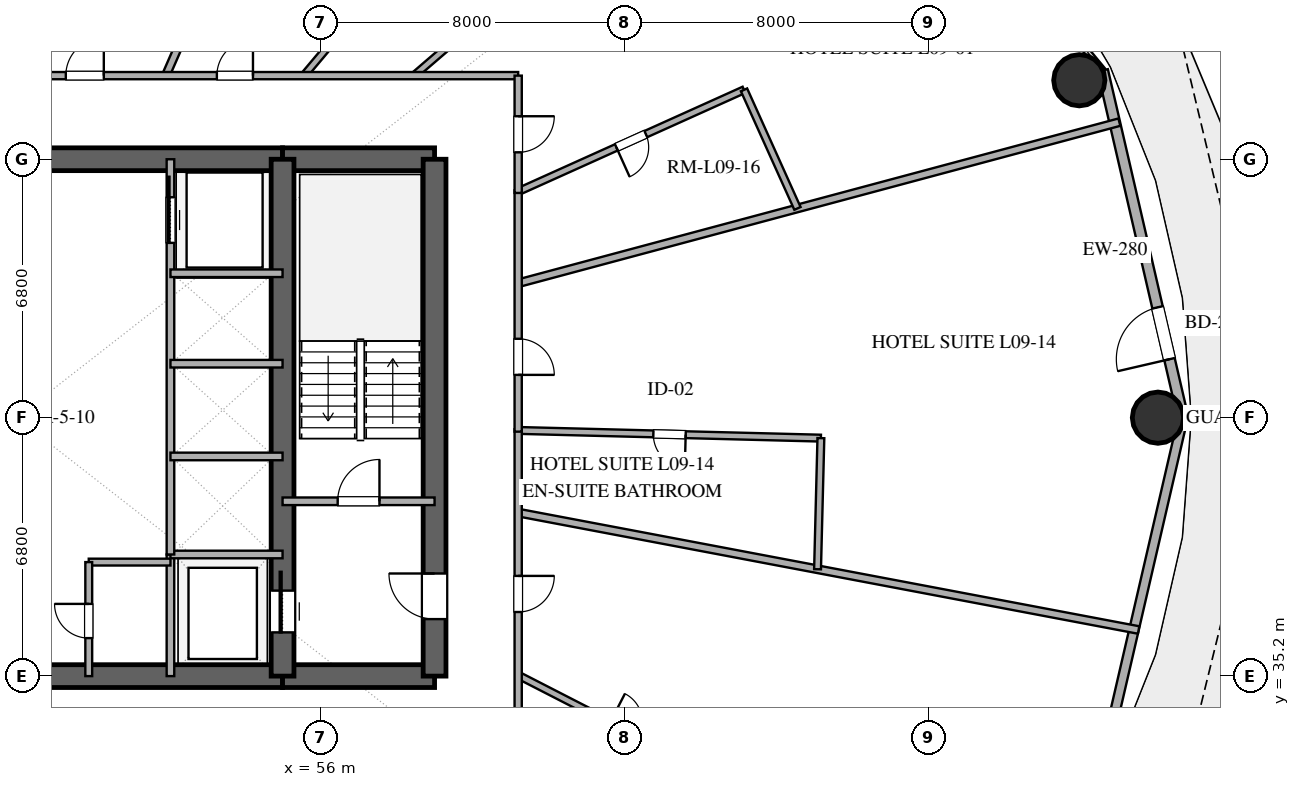
"""IFC4 building model, lengths in metres.
Left out: names, types, materials, properties, quantities, classifications, styles, units other than length and angle.
Written with IfcOpenShell. Run it as: python <this file> out.ifc"""

import sys

from ifc_helpers import new_model, si_unit, direction, frame, frame_2d, origin, origin_2d, place, context, subcontext, project, spatial, rectangle, hollow_circle, extrude, element, fill, save


model = new_model("IFC4")
c1 = context("Model", 3, precision=1e-05, world=origin(), true_north=direction((0.0, 1.0)))
c2 = subcontext(c1, "Body", "Model", "MODEL_VIEW")
j1 = project(units=[si_unit("LENGTHUNIT", "METRE"), si_unit("PLANEANGLEUNIT", "RADIAN")], contexts=[c1])
p1 = place(None, origin())
s1 = spatial("IfcSite", under=j1, at=p1, CompositionType="ELEMENT")
p2 = place(p1, origin())
s2 = spatial("IfcBuilding", under=s1, at=p2, CompositionType="ELEMENT")
p3 = place(p2, frame((0.0, 0.0, 42.6)))
s3 = spatial("IfcBuildingStorey", under=s2, at=p3, CompositionType="ELEMENT", Elevation=42.6)
p4 = place(p3, frame((41.0, 35.2, 0.0), z_axis=(0.0, 0.0, 1.0), x_axis=(1.0, 0.0, 0.0)))
e1 = element("IfcWall", 1, at=p4, inside=s3, PredefinedType="SHEAR", context=c2, shape_type="SweptSolid", body=[
    extrude(rectangle(XDim=14.0, YDim=0.6, at=frame_2d((7.0, 0.0))), origin(), (0.0, 0.0, 1.0), 3.38),
])
p5 = place(p4, frame((6.1, 0.0, 0.0)))
e2 = element("IfcOpeningElement", 2, at=p5, cuts=e1, PredefinedType="OPENING", context=c2, shape_type="SweptSolid", body=[
    extrude(rectangle(XDim=1.8, YDim=2.25, at=frame_2d((0.9, 1.125))), frame((0.0, 0.31, 0.0), z_axis=(0.0, -1.0, 0.0), x_axis=(1.0, 0.0, 0.0)), (0.0, 0.0, 1.0), 0.62),
])
p6 = place(p3, frame((55.0, 35.2, 0.0), z_axis=(0.0, 0.0, 1.0), x_axis=(1.0, 0.0, 0.0)))
e3 = element("IfcWall", 3, at=p6, inside=s3, PredefinedType="SHEAR", context=c2, shape_type="SweptSolid", body=[
    extrude(rectangle(XDim=4.0, YDim=0.6, at=frame_2d((2.0, 0.0))), origin(), (0.0, 0.0, 1.0), 3.38),
])
p7 = place(p3, frame((41.0, 48.8, 0.0), z_axis=(0.0, 0.0, 1.0), x_axis=(1.0, 0.0, 0.0)))
e4 = element("IfcWall", 4, at=p7, inside=s3, PredefinedType="SHEAR", context=c2, shape_type="SweptSolid", body=[
    extrude(rectangle(XDim=14.0, YDim=0.6, at=frame_2d((7.0, 0.0))), origin(), (0.0, 0.0, 1.0), 3.38),
])
p8 = place(p7, frame((6.1, 0.0, 0.0)))
e5 = element("IfcOpeningElement", 5, at=p8, cuts=e4, PredefinedType="OPENING", context=c2, shape_type="SweptSolid", body=[
    extrude(rectangle(XDim=1.8, YDim=2.25, at=frame_2d((0.9, 1.125))), frame((0.0, 0.31, 0.0), z_axis=(0.0, -1.0, 0.0), x_axis=(1.0, 0.0, 0.0)), (0.0, 0.0, 1.0), 0.62),
])
p9 = place(p3, frame((55.0, 48.8, 0.0), z_axis=(0.0, 0.0, 1.0), x_axis=(1.0, 0.0, 0.0)))
e6 = element("IfcWall", 6, at=p9, inside=s3, PredefinedType="SHEAR", context=c2, shape_type="SweptSolid", body=[
    extrude(rectangle(XDim=4.0, YDim=0.6, at=frame_2d((2.0, 0.0))), origin(), (0.0, 0.0, 1.0), 3.38),
])
p10 = place(p3, frame((59.0, 35.2, 0.0), z_axis=(0.0, 0.0, 1.0), x_axis=(0.0, 1.0, 0.0)))
e7 = element("IfcWall", 7, at=p10, inside=s3, PredefinedType="SHEAR", context=c2, shape_type="SweptSolid", body=[
    extrude(rectangle(XDim=13.6, YDim=0.6, at=frame_2d((6.8, 0.0))), origin(), (0.0, 0.0, 1.0), 3.38),
])
p11 = place(p10, frame((1.5, 0.0, 0.0)))
e8 = element("IfcOpeningElement", 8, at=p11, cuts=e7, PredefinedType="OPENING", context=c2, shape_type="SweptSolid", body=[
    extrude(rectangle(XDim=1.2, YDim=2.15, at=frame_2d((0.6, 1.075))), frame((0.0, 0.31, 0.0), z_axis=(0.0, -1.0, 0.0), x_axis=(1.0, 0.0, 0.0)), (0.0, 0.0, 1.0), 0.62),
])
p12 = place(p3, frame((55.0, 35.2, 0.0), z_axis=(0.0, 0.0, 1.0), x_axis=(0.0, 1.0, 0.0)))
e9 = element("IfcWall", 9, at=p12, inside=s3, PredefinedType="SHEAR", context=c2, shape_type="SweptSolid", body=[
    extrude(rectangle(XDim=13.6, YDim=0.6, at=frame_2d((6.8, 0.0))), origin(), (0.0, 0.0, 1.0), 3.38),
])
p13 = place(p12, frame((1.15, 0.0, 0.0)))
e10 = element("IfcOpeningElement", 10, at=p13, cuts=e9, PredefinedType="OPENING", context=c2, shape_type="SweptSolid", body=[
    extrude(rectangle(XDim=1.1, YDim=2.2, at=frame_2d((0.55, 1.1))), frame((0.0, 0.31, 0.0), z_axis=(0.0, -1.0, 0.0), x_axis=(1.0, 0.0, 0.0)), (0.0, 0.0, 1.0), 0.62),
])
for number, where, z_axis, x_axis in (
    (11, (78.035, 42.0, 0.0), (0.0, 0.0, 1.0), (1.0, 0.0, 0.0)),
    (12, (75.966, 50.878, 0.0), (0.0, 0.0, 1.0), (1.0, 0.0, 0.0)),
):
    element("IfcColumn", number, at=place(p3, frame(where, z_axis=z_axis, x_axis=x_axis)), inside=s3, PredefinedType="COLUMN", context=c2, shape_type="SweptSolid", body=[
        extrude(hollow_circle(Radius=0.675, WallThickness=0.036, at=origin_2d()), origin(), (0.0, 0.0, 1.0), 3.38),
    ])
p14 = place(p3, frame((78.696, 42.0, 0.0), z_axis=(0.0, 0.0, 1.0), x_axis=(-0.225454452941, 0.974253709076, 0.0)))
e13 = element("IfcWall", 13, at=p14, inside=s3, PredefinedType="SOLIDWALL", context=c2, shape_type="SweptSolid", body=[
    extrude(rectangle(XDim=9.38, YDim=0.28, at=frame_2d((4.69, 0.0))), origin(), (0.0, 0.0, 1.0), 3.38),
])
p15 = place(p14, frame((1.579, 0.0, 0.0)))
e14 = element("IfcOpeningElement", 14, at=p15, cuts=e13, PredefinedType="OPENING", context=c2, shape_type="SweptSolid", body=[
    extrude(rectangle(XDim=1.4, YDim=2.2, at=frame_2d((0.7, 1.1))), frame((0.0, 0.15, 0.0), z_axis=(0.0, -1.0, 0.0), x_axis=(1.0, 0.0, 0.0)), (0.0, 0.0, 1.0), 0.3),
])
p16 = place(p3, frame((76.581, 32.862, 0.0), z_axis=(0.0, 0.0, 1.0), x_axis=(0.225454452941, 0.974253709076, 0.0)))
e15 = element("IfcWall", 15, at=p16, inside=s3, PredefinedType="SOLIDWALL", context=c2, shape_type="SweptSolid", body=[
    extrude(rectangle(XDim=9.38, YDim=0.25, at=frame_2d((4.69, 0.0))), origin(), (0.0, 0.0, 1.0), 3.38),
])
p17 = place(p3, frame((55.0, 39.8, 0.0), z_axis=(0.0, 0.0, 1.0), x_axis=(1.0, 0.0, 0.0)))
e16 = element("IfcWall", 16, at=p17, inside=s3, PredefinedType="SOLIDWALL", context=c2, shape_type="SweptSolid", body=[
    extrude(rectangle(XDim=4.0, YDim=0.2, at=frame_2d((2.0, 0.0))), origin(), (0.0, 0.0, 1.0), 2.74),
])
p18 = place(p17, frame((1.45, 0.0, 0.0)))
e17 = element("IfcOpeningElement", 17, at=p18, cuts=e16, PredefinedType="OPENING", context=c2, shape_type="SweptSolid", body=[
    extrude(rectangle(XDim=1.1, YDim=2.15, at=frame_2d((0.55, 1.075))), frame((0.0, 0.11, 0.0), z_axis=(0.0, -1.0, 0.0), x_axis=(1.0, 0.0, 0.0)), (0.0, 0.0, 1.0), 0.22),
])
p19 = place(p3, frame((52.05, 35.2, 0.0), z_axis=(0.0, 0.0, 1.0), x_axis=(0.0, 1.0, 0.0)))
e18 = element("IfcWall", 18, at=p19, inside=s3, PredefinedType="SOLIDWALL", context=c2, shape_type="SweptSolid", body=[
    extrude(rectangle(XDim=3.2, YDim=0.2, at=frame_2d((1.6, 0.0))), origin(), (0.0, 0.0, 1.0), 2.74),
])
p20 = place(p3, frame((52.05, 38.4, 0.0), z_axis=(0.0, 0.0, 1.0), x_axis=(1.0, 0.0, 0.0)))
e19 = element("IfcWall", 19, at=p20, inside=s3, PredefinedType="SOLIDWALL", context=c2, shape_type="SweptSolid", body=[
    extrude(rectangle(XDim=2.95, YDim=0.2, at=frame_2d((1.475, 0.0))), origin(), (0.0, 0.0, 1.0), 2.74),
])
p21 = place(p3, frame((52.05, 38.4, 0.0), z_axis=(0.0, 0.0, 1.0), x_axis=(0.0, 1.0, 0.0)))
e20 = element("IfcWall", 20, at=p21, inside=s3, PredefinedType="SOLIDWALL", context=c2, shape_type="SweptSolid", body=[
    extrude(rectangle(XDim=10.4, YDim=0.2, at=frame_2d((5.2, 0.0))), origin(), (0.0, 0.0, 1.0), 2.74),
])
p22 = place(p21, frame((8.2, 0.0, 0.0)))
e21 = element("IfcOpeningElement", 21, at=p22, cuts=e20, PredefinedType="OPENING", context=c2, shape_type="SweptSolid", body=[
    extrude(rectangle(XDim=1.2, YDim=2.2, at=frame_2d((0.6, 1.1))), frame((0.0, 0.11, 0.0), z_axis=(0.0, -1.0, 0.0), x_axis=(1.0, 0.0, 0.0)), (0.0, 0.0, 1.0), 0.22),
])
for number, where, z_axis, x_axis in (
    (22, (52.05, 40.98, 0.0), (0.0, 0.0, 1.0), (1.0, 0.0, 0.0)),
    (23, (52.05, 43.42, 0.0), (0.0, 0.0, 1.0), (1.0, 0.0, 0.0)),
    (24, (52.05, 45.8, 0.0), (0.0, 0.0, 1.0), (1.0, 0.0, 0.0)),
):
    element("IfcWall", number, at=place(p3, frame(where, z_axis=z_axis, x_axis=x_axis)), inside=s3, PredefinedType="SOLIDWALL", context=c2, shape_type="SweptSolid", body=[
        extrude(rectangle(XDim=2.95, YDim=0.2, at=frame_2d((1.475, 0.0))), origin(), (0.0, 0.0, 1.0), 2.74),
    ])
p23 = place(p3, frame((49.9, 38.2, 0.0), z_axis=(0.0, 0.0, 1.0), x_axis=(1.0, 0.0, 0.0)))
e25 = element("IfcWall", 25, at=p23, inside=s3, PredefinedType="PLUMBINGWALL", context=c2, shape_type="SweptSolid", body=[
    extrude(rectangle(XDim=2.15, YDim=0.18, at=frame_2d((1.075, 0.0))), origin(), (0.0, 0.0, 1.0), 2.74),
])
p24 = place(p3, frame((49.9, 35.2, 0.0), z_axis=(0.0, 0.0, 1.0), x_axis=(0.0, 1.0, 0.0)))
e26 = element("IfcWall", 26, at=p24, inside=s3, PredefinedType="PLUMBINGWALL", context=c2, shape_type="SweptSolid", body=[
    extrude(rectangle(XDim=3.0, YDim=0.18, at=frame_2d((1.5, 0.0))), origin(), (0.0, 0.0, 1.0), 2.74),
])
p25 = place(p24, frame((1.0, 0.0, 0.0)))
e27 = element("IfcOpeningElement", 27, at=p25, cuts=e26, PredefinedType="OPENING", context=c2, shape_type="SweptSolid", body=[
    extrude(rectangle(XDim=0.9, YDim=2.1, at=frame_2d((0.45, 1.05))), frame((0.0, 0.1, 0.0), z_axis=(0.0, -1.0, 0.0), x_axis=(1.0, 0.0, 0.0)), (0.0, 0.0, 1.0), 0.2),
])
p26 = place(p3, frame((57.825, 64.519, 0.0), z_axis=(0.0, 0.0, 1.0), x_axis=(-0.399884283786, -0.916565632991, 0.0)))
e28 = element("IfcWall", 28, at=p26, inside=s3, PredefinedType="PARTITIONING", context=c2, shape_type="SweptSolid", body=[
    extrude(rectangle(XDim=14.749, YDim=0.2, at=frame_2d((7.375, 0.0))), origin(), (0.0, 0.0, 1.0), 2.74),
])
p27 = place(p3, frame((61.2, 45.537, 0.0), z_axis=(0.0, 0.0, 1.0), x_axis=(0.965922233104, 0.258832454679, 0.0)))
e29 = element("IfcWall", 29, at=p27, inside=s3, PredefinedType="PARTITIONING", context=c2, shape_type="SweptSolid", body=[
    extrude(rectangle(XDim=16.377, YDim=0.2, at=frame_2d((8.189, 0.0))), origin(), (0.0, 0.0, 1.0), 2.74),
])
p28 = place(p3, frame((61.2, 39.502, 0.0), z_axis=(0.0, 0.0, 1.0), x_axis=(0.982565603173, -0.185916205484, 0.0)))
e30 = element("IfcWall", 30, at=p28, inside=s3, PredefinedType="PARTITIONING", context=c2, shape_type="SweptSolid", body=[
    extrude(rectangle(XDim=16.616, YDim=0.2, at=frame_2d((8.308, 0.0))), origin(), (0.0, 0.0, 1.0), 2.74),
])
p29 = place(p3, frame((69.165, 41.462, 0.0), z_axis=(0.0, 0.0, 1.0), x_axis=(-0.999676564425, 0.025431605115, 0.0)))
e31 = element("IfcWall", 31, at=p29, inside=s3, PredefinedType="PLUMBINGWALL", context=c2, shape_type="SweptSolid", body=[
    extrude(rectangle(XDim=7.968, YDim=0.18, at=frame_2d((3.984, 0.0))), origin(), (0.0, 0.0, 1.0), 2.74),
])
p30 = place(p29, frame((3.559, 0.0, 0.0)))
e32 = element("IfcOpeningElement", 32, at=p30, cuts=e31, PredefinedType="OPENING", context=c2, shape_type="SweptSolid", body=[
    extrude(rectangle(XDim=0.85, YDim=2.1, at=frame_2d((0.425, 1.05))), frame((0.0, 0.1, 0.0), z_axis=(0.0, -1.0, 0.0), x_axis=(1.0, 0.0, 0.0)), (0.0, 0.0, 1.0), 0.2),
])
p31 = place(p3, frame((55.56, 51.0, 0.0), z_axis=(0.0, 0.0, 1.0), x_axis=(0.643154836645, 0.765736153058, 0.0)))
e33 = element("IfcWall", 33, at=p31, inside=s3, PredefinedType="PLUMBINGWALL", context=c2, shape_type="SweptSolid", body=[
    extrude(rectangle(XDim=6.917, YDim=0.18, at=frame_2d((3.458, 0.0))), origin(), (0.0, 0.0, 1.0), 2.74),
])
p32 = place(p31, frame((3.034, 0.0, 0.0)))
e34 = element("IfcOpeningElement", 34, at=p32, cuts=e33, PredefinedType="OPENING", context=c2, shape_type="SweptSolid", body=[
    extrude(rectangle(XDim=0.85, YDim=2.1, at=frame_2d((0.425, 1.05))), frame((0.0, 0.1, 0.0), z_axis=(0.0, -1.0, 0.0), x_axis=(1.0, 0.0, 0.0)), (0.0, 0.0, 1.0), 0.2),
])
p33 = place(p3, frame((67.143, 50.626, 0.0), z_axis=(0.0, 0.0, 1.0), x_axis=(-0.911702033518, -0.410852044025, 0.0)))
e35 = element("IfcWall", 35, at=p33, inside=s3, PredefinedType="PLUMBINGWALL", context=c2, shape_type="SweptSolid", body=[
    extrude(rectangle(XDim=6.519, YDim=0.18, at=frame_2d((3.259, 0.0))), origin(), (0.0, 0.0, 1.0), 2.74),
])
p34 = place(p33, frame((2.834, 0.0, 0.0)))
e36 = element("IfcOpeningElement", 36, at=p34, cuts=e35, PredefinedType="OPENING", context=c2, shape_type="SweptSolid", body=[
    extrude(rectangle(XDim=0.85, YDim=2.1, at=frame_2d((0.425, 1.05))), frame((0.0, 0.1, 0.0), z_axis=(0.0, -1.0, 0.0), x_axis=(1.0, 0.0, 0.0)), (0.0, 0.0, 1.0), 0.2),
])
p35 = place(p3, frame((61.2, 35.224, 0.0), z_axis=(0.0, 0.0, 1.0), x_axis=(0.889651376734, -0.456640370395, 0.0)))
e37 = element("IfcWall", 37, at=p35, inside=s3, PredefinedType="PLUMBINGWALL", context=c2, shape_type="SweptSolid", body=[
    extrude(rectangle(XDim=6.292, YDim=0.18, at=frame_2d((3.146, 0.0))), origin(), (0.0, 0.0, 1.0), 2.74),
])
p36 = place(p35, frame((2.721, 0.0, 0.0)))
e38 = element("IfcOpeningElement", 38, at=p36, cuts=e37, PredefinedType="OPENING", context=c2, shape_type="SweptSolid", body=[
    extrude(rectangle(XDim=0.85, YDim=2.1, at=frame_2d((0.425, 1.05))), frame((0.0, 0.1, 0.0), z_axis=(0.0, -1.0, 0.0), x_axis=(1.0, 0.0, 0.0)), (0.0, 0.0, 1.0), 0.2),
])
p37 = place(p3, frame((62.339, 54.339, 0.0), z_axis=(0.0, 0.0, 1.0), x_axis=(-0.757969199921, -0.652290343307, 0.0)))
e39 = element("IfcWall", 39, at=p37, inside=s3, PredefinedType="PLUMBINGWALL", context=c2, shape_type="SweptSolid", body=[
    extrude(rectangle(XDim=5.119, YDim=0.18, at=frame_2d((2.56, 0.0))), origin(), (0.0, 0.0, 1.0), 2.74),
])
p38 = place(p3, frame((61.2, 41.696, 0.0), z_axis=(0.0, 0.0, 1.0), x_axis=(0.0, -1.0, 0.0)))
e40 = element("IfcWall", 40, at=p38, inside=s3, PredefinedType="PARTITIONING", context=c2, shape_type="SweptSolid", body=[
    extrude(rectangle(XDim=8.696, YDim=0.19, at=frame_2d((4.348, 0.0))), origin(), (0.0, 0.0, 1.0), 2.74),
])
p39 = place(p38, frame((3.86, 0.0, 0.0)))
e41 = element("IfcOpeningElement", 41, at=p39, cuts=e40, PredefinedType="OPENING", context=c2, shape_type="SweptSolid", body=[
    extrude(rectangle(XDim=0.95, YDim=2.15, at=frame_2d((0.475, 1.075))), frame((0.0, 0.105, 0.0), z_axis=(0.0, -1.0, 0.0), x_axis=(1.0, 0.0, 0.0)), (0.0, 0.0, 1.0), 0.21),
])
p40 = place(p3, frame((46.153, 51.0, 0.0), z_axis=(0.0, 0.0, 1.0), x_axis=(1.0, 0.0, 0.0)))
e42 = element("IfcWall", 42, at=p40, inside=s3, PredefinedType="PARTITIONING", context=c2, shape_type="SweptSolid", body=[
    extrude(rectangle(XDim=15.047, YDim=0.19, at=frame_2d((7.524, 0.0))), origin(), (0.0, 0.0, 1.0), 2.74),
])
p41 = place(p40, frame((3.144, 0.0, 0.0)))
e43 = element("IfcOpeningElement", 43, at=p41, cuts=e42, PredefinedType="OPENING", context=c2, shape_type="SweptSolid", body=[
    extrude(rectangle(XDim=1.0, YDim=2.2, at=frame_2d((0.5, 1.1))), frame((0.0, 0.105, 0.0), z_axis=(0.0, -1.0, 0.0), x_axis=(1.0, 0.0, 0.0)), (0.0, 0.0, 1.0), 0.21),
])
p42 = place(p40, frame((7.119, 0.0, 0.0)))
e44 = element("IfcOpeningElement", 44, at=p42, cuts=e42, PredefinedType="OPENING", context=c2, shape_type="SweptSolid", body=[
    extrude(rectangle(XDim=0.95, YDim=2.15, at=frame_2d((0.475, 1.075))), frame((0.0, 0.105, 0.0), z_axis=(0.0, -1.0, 0.0), x_axis=(1.0, 0.0, 0.0)), (0.0, 0.0, 1.0), 0.21),
])
p43 = place(p3, frame((61.2, 47.983, 0.0), z_axis=(0.0, 0.0, 1.0), x_axis=(0.0, -1.0, 0.0)))
e45 = element("IfcWall", 45, at=p43, inside=s3, PredefinedType="PARTITIONING", context=c2, shape_type="SweptSolid", body=[
    extrude(rectangle(XDim=6.351, YDim=0.19, at=frame_2d((3.176, 0.0))), origin(), (0.0, 0.0, 1.0), 2.74),
])
p44 = place(p43, frame((3.907, 0.0, 0.0)))
e46 = element("IfcOpeningElement", 46, at=p44, cuts=e45, PredefinedType="OPENING", context=c2, shape_type="SweptSolid", body=[
    extrude(rectangle(XDim=0.95, YDim=2.15, at=frame_2d((0.475, 1.075))), frame((0.0, 0.105, 0.0), z_axis=(0.0, -1.0, 0.0), x_axis=(1.0, 0.0, 0.0)), (0.0, 0.0, 1.0), 0.21),
])
p45 = place(p3, frame((69.078, 38.012, 0.0), z_axis=(0.0, 0.0, 1.0), x_axis=(0.02539873932, 0.999677399985, 0.0)))
e47 = element("IfcWall", 47, at=p45, inside=s3, PredefinedType="PLUMBINGWALL", context=c2, shape_type="SweptSolid", body=[
    extrude(rectangle(XDim=3.451, YDim=0.18, at=frame_2d((1.726, 0.0))), origin(), (0.0, 0.0, 1.0), 2.74),
])
p46 = place(p3, frame((68.549, 47.506, 0.0), z_axis=(0.0, 0.0, 1.0), x_axis=(-0.410839223928, 0.911707810695, 0.0)))
e48 = element("IfcWall", 48, at=p46, inside=s3, PredefinedType="PLUMBINGWALL", context=c2, shape_type="SweptSolid", body=[
    extrude(rectangle(XDim=3.422, YDim=0.18, at=frame_2d((1.711, 0.0))), origin(), (0.0, 0.0, 1.0), 2.74),
])
p47 = place(p3, frame((61.2, 51.0, 0.0), z_axis=(0.0, 0.0, 1.0), x_axis=(0.0, -1.0, 0.0)))
e49 = element("IfcWall", 49, at=p47, inside=s3, PredefinedType="PARTITIONING", context=c2, shape_type="SweptSolid", body=[
    extrude(rectangle(XDim=3.087, YDim=0.19, at=frame_2d((1.543, 0.0))), origin(), (0.0, 0.0, 1.0), 2.74),
])
p48 = place(p47, frame((1.069, 0.0, 0.0)))
e50 = element("IfcOpeningElement", 50, at=p48, cuts=e49, PredefinedType="OPENING", context=c2, shape_type="SweptSolid", body=[
    extrude(rectangle(XDim=0.95, YDim=2.15, at=frame_2d((0.475, 1.075))), frame((0.0, 0.105, 0.0), z_axis=(0.0, -1.0, 0.0), x_axis=(1.0, 0.0, 0.0)), (0.0, 0.0, 1.0), 0.21),
])
p49 = place(p15, origin())
e51 = element("IfcDoor", 51, at=p49, inside=s3, OperationType="SINGLE_SWING_LEFT", PredefinedType="DOOR", context=c2, shape_type="SweptSolid", body=[
    extrude(rectangle(XDim=1.4, YDim=2.2, at=frame_2d((0.7, 1.1))), frame((0.0, 0.025, 0.0), z_axis=(0.0, -1.0, 0.0), x_axis=(1.0, 0.0, 0.0)), (0.0, 0.0, 1.0), 0.05),
])
fill(e14, e51)
p50 = place(p13, origin())
e52 = element("IfcDoor", 52, at=p50, inside=s3, OperationType="SLIDING_TO_RIGHT", PredefinedType="DOOR", context=c2, shape_type="SweptSolid", body=[
    extrude(rectangle(XDim=1.1, YDim=2.2, at=frame_2d((0.55, 1.1))), frame((0.0, 0.025, 0.0), z_axis=(0.0, -1.0, 0.0), x_axis=(1.0, 0.0, 0.0)), (0.0, 0.0, 1.0), 0.05),
])
fill(e10, e52)
p51 = place(p11, origin())
e53 = element("IfcDoor", 53, at=p51, inside=s3, OperationType="SINGLE_SWING_RIGHT", PredefinedType="DOOR", context=c2, shape_type="SweptSolid", body=[
    extrude(rectangle(XDim=1.2, YDim=2.15, at=frame_2d((0.6, 1.075))), frame((0.0, 0.025, 0.0), z_axis=(0.0, -1.0, 0.0), x_axis=(1.0, 0.0, 0.0)), (0.0, 0.0, 1.0), 0.05),
])
fill(e8, e53)
p52 = place(p18, origin())
e54 = element("IfcDoor", 54, at=p52, inside=s3, OperationType="SINGLE_SWING_RIGHT", PredefinedType="DOOR", context=c2, shape_type="SweptSolid", body=[
    extrude(rectangle(XDim=1.1, YDim=2.15, at=frame_2d((0.55, 1.075))), frame((0.0, 0.025, 0.0), z_axis=(0.0, -1.0, 0.0), x_axis=(1.0, 0.0, 0.0)), (0.0, 0.0, 1.0), 0.05),
])
fill(e17, e54)
p53 = place(p22, origin())
e55 = element("IfcDoor", 55, at=p53, inside=s3, OperationType="SLIDING_TO_RIGHT", PredefinedType="DOOR", context=c2, shape_type="SweptSolid", body=[
    extrude(rectangle(XDim=1.2, YDim=2.2, at=frame_2d((0.6, 1.1))), frame((0.0, 0.025, 0.0), z_axis=(0.0, -1.0, 0.0), x_axis=(1.0, 0.0, 0.0)), (0.0, 0.0, 1.0), 0.05),
])
fill(e21, e55)
p54 = place(p25, origin())
e56 = element("IfcDoor", 56, at=p54, inside=s3, OperationType="SINGLE_SWING_RIGHT", PredefinedType="DOOR", context=c2, shape_type="SweptSolid", body=[
    extrude(rectangle(XDim=0.9, YDim=2.1, at=frame_2d((0.45, 1.05))), frame((0.0, 0.025, 0.0), z_axis=(0.0, -1.0, 0.0), x_axis=(1.0, 0.0, 0.0)), (0.0, 0.0, 1.0), 0.05),
])
fill(e27, e56)
p55 = place(p30, origin())
e57 = element("IfcDoor", 57, at=p55, inside=s3, OperationType="SINGLE_SWING_LEFT", PredefinedType="DOOR", context=c2, shape_type="SweptSolid", body=[
    extrude(rectangle(XDim=0.85, YDim=2.1, at=frame_2d((0.425, 1.05))), frame((0.0, 0.025, 0.0), z_axis=(0.0, -1.0, 0.0), x_axis=(1.0, 0.0, 0.0)), (0.0, 0.0, 1.0), 0.05),
])
fill(e32, e57)
p56 = place(p34, origin())
e58 = element("IfcDoor", 58, at=p56, inside=s3, OperationType="SINGLE_SWING_RIGHT", PredefinedType="DOOR", context=c2, shape_type="SweptSolid", body=[
    extrude(rectangle(XDim=0.85, YDim=2.1, at=frame_2d((0.425, 1.05))), frame((0.0, 0.025, 0.0), z_axis=(0.0, -1.0, 0.0), x_axis=(1.0, 0.0, 0.0)), (0.0, 0.0, 1.0), 0.05),
])
fill(e36, e58)
p57 = place(p39, origin())
e59 = element("IfcDoor", 59, at=p57, inside=s3, OperationType="SINGLE_SWING_LEFT", PredefinedType="DOOR", context=c2, shape_type="SweptSolid", body=[
    extrude(rectangle(XDim=0.95, YDim=2.15, at=frame_2d((0.475, 1.075))), frame((0.0, 0.025, 0.0), z_axis=(0.0, -1.0, 0.0), x_axis=(1.0, 0.0, 0.0)), (0.0, 0.0, 1.0), 0.05),
])
fill(e41, e59)
p58 = place(p41, origin())
e60 = element("IfcDoor", 60, at=p58, inside=s3, OperationType="SINGLE_SWING_RIGHT", PredefinedType="DOOR", context=c2, shape_type="SweptSolid", body=[
    extrude(rectangle(XDim=1.0, YDim=2.2, at=frame_2d((0.5, 1.1))), frame((0.0, 0.025, 0.0), z_axis=(0.0, -1.0, 0.0), x_axis=(1.0, 0.0, 0.0)), (0.0, 0.0, 1.0), 0.05),
])
fill(e43, e60)
p59 = place(p42, origin())
e61 = element("IfcDoor", 61, at=p59, inside=s3, OperationType="SINGLE_SWING_RIGHT", PredefinedType="DOOR", context=c2, shape_type="SweptSolid", body=[
    extrude(rectangle(XDim=0.95, YDim=2.15, at=frame_2d((0.475, 1.075))), frame((0.0, 0.025, 0.0), z_axis=(0.0, -1.0, 0.0), x_axis=(1.0, 0.0, 0.0)), (0.0, 0.0, 1.0), 0.05),
])
fill(e44, e61)
p60 = place(p44, origin())
e62 = element("IfcDoor", 62, at=p60, inside=s3, OperationType="SINGLE_SWING_RIGHT", PredefinedType="DOOR", context=c2, shape_type="SweptSolid", body=[
    extrude(rectangle(XDim=0.95, YDim=2.15, at=frame_2d((0.475, 1.075))), frame((0.0, 0.025, 0.0), z_axis=(0.0, -1.0, 0.0), x_axis=(1.0, 0.0, 0.0)), (0.0, 0.0, 1.0), 0.05),
])
fill(e46, e62)
p61 = place(p48, origin())
e63 = element("IfcDoor", 63, at=p61, inside=s3, OperationType="SINGLE_SWING_LEFT", PredefinedType="DOOR", context=c2, shape_type="SweptSolid", body=[
    extrude(rectangle(XDim=0.95, YDim=2.15, at=frame_2d((0.475, 1.075))), frame((0.0, 0.025, 0.0), z_axis=(0.0, -1.0, 0.0), x_axis=(1.0, 0.0, 0.0)), (0.0, 0.0, 1.0), 0.05),
])
fill(e50, e63)
save(model, sys.argv[1])
